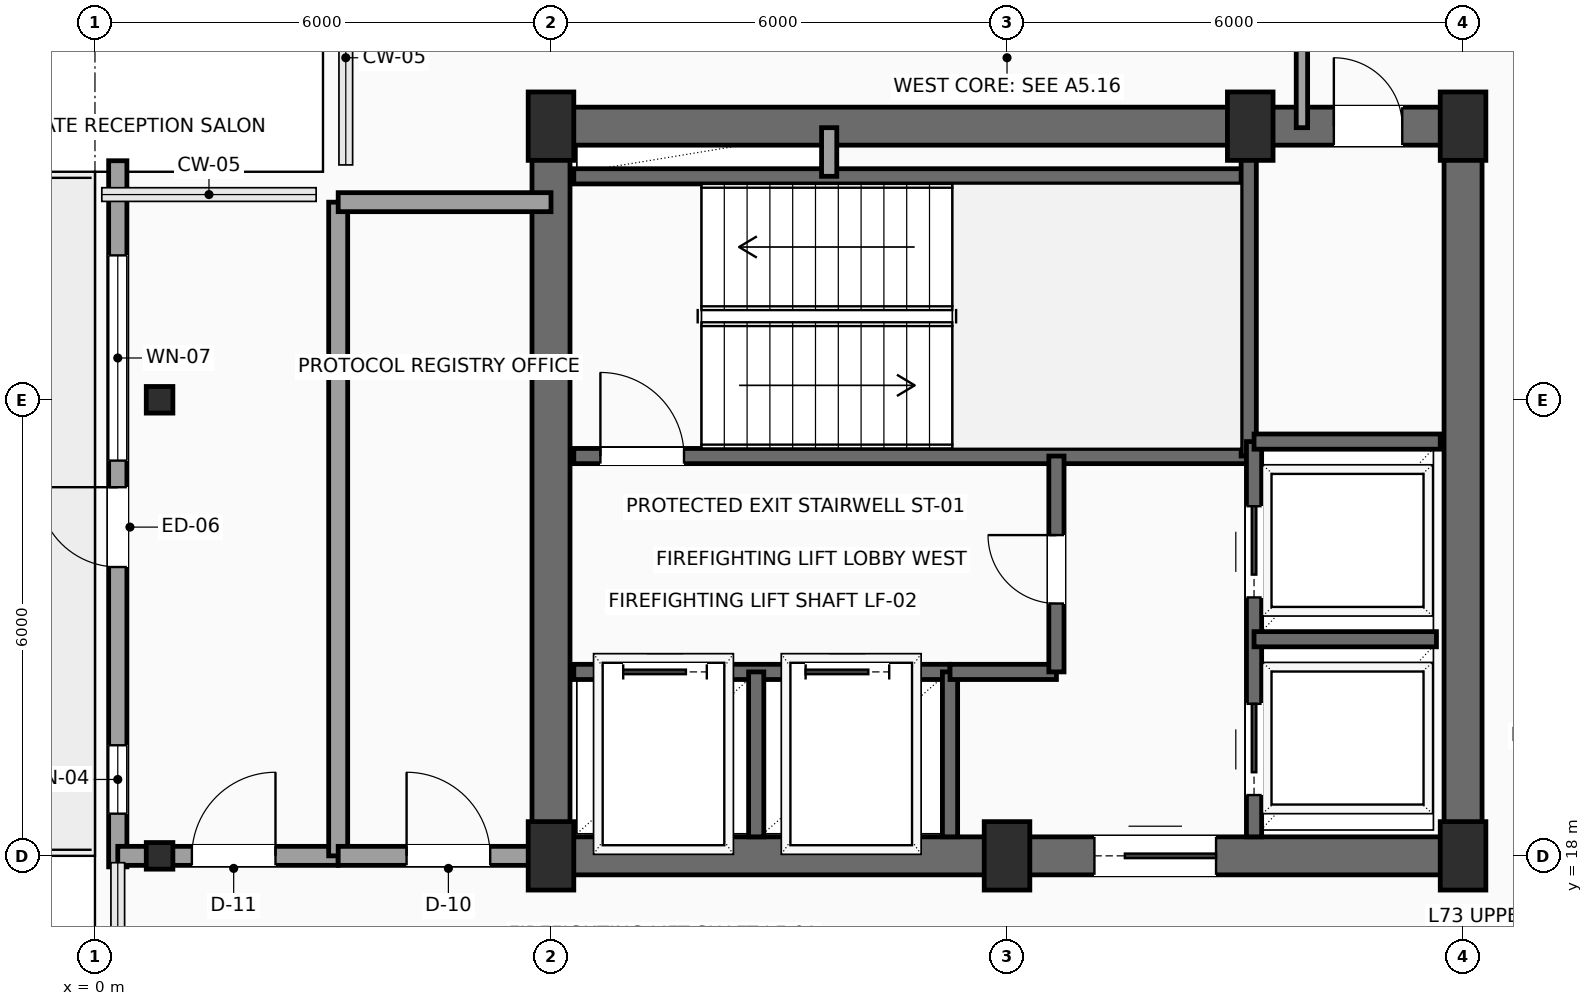
"""IFC4 building model, lengths in metres.
Left out: names, types, materials, properties, quantities, classifications, styles, units other than length and angle.
Written with IfcOpenShell. Run it as: python <this file> out.ifc"""

import sys

from ifc_helpers import new_model, si_unit, direction, frame, frame_2d, origin, origin_2d, place, context, subcontext, project, spatial, rectangle, hollow_rectangle, extrude, element, fill, save


model = new_model("IFC4")
c1 = context("Model", 3, precision=1e-05, world=origin(), true_north=direction((0.0, 1.0)))
c2 = subcontext(c1, "Body", "Model", "MODEL_VIEW")
j1 = project(units=[si_unit("LENGTHUNIT", "METRE"), si_unit("PLANEANGLEUNIT", "RADIAN")], contexts=[c1])
p1 = place(None, origin())
s1 = spatial("IfcSite", under=j1, at=p1, CompositionType="ELEMENT")
p2 = place(p1, origin())
s2 = spatial("IfcBuilding", under=s1, at=p2, CompositionType="ELEMENT")
p3 = place(p2, frame((0.0, 0.0, 288.7)))
s3 = spatial("IfcBuildingStorey", under=s2, at=p3, CompositionType="ELEMENT", Elevation=288.7)
for number, where, z_axis, x_axis in (
    (1, (6.0, 18.0, 0.0), (0.0, 0.0, 1.0), (1.0, 0.0, 0.0)),
    (2, (12.0, 18.0, 0.0), (0.0, 0.0, 1.0), (1.0, 0.0, 0.0)),
    (3, (18.0, 18.0, 0.0), (0.0, 0.0, 1.0), (1.0, 0.0, 0.0)),
    (4, (6.0, 27.6, 0.0), (0.0, 0.0, 1.0), (1.0, 0.0, 0.0)),
    (5, (15.2, 27.6, 0.0), (0.0, 0.0, 1.0), (1.0, 0.0, 0.0)),
    (6, (18.0, 27.6, 0.0), (0.0, 0.0, 1.0), (1.0, 0.0, 0.0)),
):
    element("IfcColumn", number, at=place(p3, frame(where, z_axis=z_axis, x_axis=x_axis)), inside=s3, PredefinedType="COLUMN", context=c2, shape_type="SweptSolid", body=[
        extrude(rectangle(XDim=0.6, YDim=0.9, at=origin_2d()), origin(), (0.0, 0.0, 1.0), 3.5),
    ])
for number, where, z_axis, x_axis in (
    (7, (0.85, 18.0, 0.0), (0.0, 0.0, 1.0), (1.0, 0.0, 0.0)),
    (8, (0.85, 24.0, 0.0), (0.0, 0.0, 1.0), (1.0, 0.0, 0.0)),
):
    element("IfcColumn", number, at=place(p3, frame(where, z_axis=z_axis, x_axis=x_axis)), inside=s3, PredefinedType="COLUMN", context=c2, shape_type="SweptSolid", body=[
        extrude(hollow_rectangle(XDim=0.35, YDim=0.35, WallThickness=0.016, InnerFilletRadius=0.016, OuterFilletRadius=0.032, at=origin_2d()), origin(), (0.0, 0.0, 1.0), 3.5),
    ])
p4 = place(p3, frame((0.3, 17.855, 0.0), z_axis=(0.0, 0.0, 1.0), x_axis=(0.0, 1.0, 0.0)))
e9 = element("IfcWall", 9, at=p4, inside=s3, PredefinedType="SOLIDWALL", context=c2, shape_type="SweptSolid", body=[
    extrude(rectangle(XDim=9.29, YDim=0.24, at=frame_2d((4.645, 0.0))), origin(), (0.0, 0.0, 1.0), 3.3),
])
p5 = place(p4, frame((3.945, 0.0, 0.0)))
e10 = element("IfcOpeningElement", 10, at=p5, cuts=e9, PredefinedType="OPENING", context=c2, shape_type="SweptSolid", body=[
    extrude(rectangle(XDim=1.05, YDim=2.2, at=frame_2d((0.525, 1.1))), frame((0.0, 0.13, 0.0), z_axis=(0.0, -1.0, 0.0), x_axis=(1.0, 0.0, 0.0)), (0.0, 0.0, 1.0), 0.26),
])
p6 = place(p4, frame((5.345, 0.0, 0.6)))
e11 = element("IfcOpeningElement", 11, at=p6, cuts=e9, PredefinedType="OPENING", context=c2, shape_type="SweptSolid", body=[
    extrude(rectangle(XDim=2.7, YDim=2.3, at=frame_2d((1.35, 1.15))), frame((0.0, 0.13, 0.0), z_axis=(0.0, -1.0, 0.0), x_axis=(1.0, 0.0, 0.0)), (0.0, 0.0, 1.0), 0.26),
])
p7 = place(p4, frame((0.7, 0.0, 0.6)))
e12 = element("IfcOpeningElement", 12, at=p7, cuts=e9, PredefinedType="OPENING", context=c2, shape_type="SweptSolid", body=[
    extrude(rectangle(XDim=0.9, YDim=2.2, at=frame_2d((0.45, 1.1))), frame((0.0, 0.13, 0.0), z_axis=(0.0, -1.0, 0.0), x_axis=(1.0, 0.0, 0.0)), (0.0, 0.0, 1.0), 0.26),
])
p8 = place(p3, frame((6.0, 18.0, 0.0), z_axis=(0.0, 0.0, 1.0), x_axis=(1.0, 0.0, 0.0)))
e13 = element("IfcWall", 13, at=p8, inside=s3, PredefinedType="SHEAR", context=c2, shape_type="SweptSolid", body=[
    extrude(rectangle(XDim=12.0, YDim=0.5, at=frame_2d((6.0, 0.0))), origin(), (0.0, 0.0, 1.0), 3.3),
])
p9 = place(p8, frame((7.15, 0.0, 0.0)))
e14 = element("IfcOpeningElement", 14, at=p9, cuts=e13, PredefinedType="OPENING", context=c2, shape_type="SweptSolid", body=[
    extrude(rectangle(XDim=1.6, YDim=2.3, at=frame_2d((0.8, 1.15))), frame((0.0, 0.26, 0.0), z_axis=(0.0, -1.0, 0.0), x_axis=(1.0, 0.0, 0.0)), (0.0, 0.0, 1.0), 0.52),
])
p10 = place(p3, frame((6.0, 27.6, 0.0), z_axis=(0.0, 0.0, 1.0), x_axis=(1.0, 0.0, 0.0)))
e15 = element("IfcWall", 15, at=p10, inside=s3, PredefinedType="SHEAR", context=c2, shape_type="SweptSolid", body=[
    extrude(rectangle(XDim=12.0, YDim=0.5, at=frame_2d((6.0, 0.0))), origin(), (0.0, 0.0, 1.0), 3.3),
])
p11 = place(p10, frame((10.3, 0.0, 0.0)))
e16 = element("IfcOpeningElement", 16, at=p11, cuts=e15, PredefinedType="OPENING", context=c2, shape_type="SweptSolid", body=[
    extrude(rectangle(XDim=0.9, YDim=2.15, at=frame_2d((0.45, 1.075))), frame((0.0, 0.26, 0.0), z_axis=(0.0, -1.0, 0.0), x_axis=(1.0, 0.0, 0.0)), (0.0, 0.0, 1.0), 0.52),
])
for number, where, z_axis, x_axis in (
    (17, (6.0, 18.0, 0.0), (0.0, 0.0, 1.0), (0.0, 1.0, 0.0)),
    (18, (18.0, 18.0, 0.0), (0.0, 0.0, 1.0), (0.0, 1.0, 0.0)),
):
    element("IfcWall", number, at=place(p3, frame(where, z_axis=z_axis, x_axis=x_axis)), inside=s3, PredefinedType="SHEAR", context=c2, shape_type="SweptSolid", body=[
        extrude(rectangle(XDim=9.6, YDim=0.5, at=frame_2d((4.8, 0.0))), origin(), (0.0, 0.0, 1.0), 3.3),
    ])
p12 = place(p3, frame((6.3, 23.26, 0.0), z_axis=(0.0, 0.0, 1.0), x_axis=(1.0, 0.0, 0.0)))
e19 = element("IfcWall", 19, at=p12, inside=s3, PredefinedType="SHEAR", context=c2, shape_type="SweptSolid", body=[
    extrude(rectangle(XDim=8.88, YDim=0.2, at=frame_2d((4.44, 0.0))), origin(), (0.0, 0.0, 1.0), 3.3),
])
p13 = place(p12, frame((0.35, 0.0, 0.0)))
e20 = element("IfcOpeningElement", 20, at=p13, cuts=e19, PredefinedType="OPENING", context=c2, shape_type="SweptSolid", body=[
    extrude(rectangle(XDim=1.1, YDim=2.2, at=frame_2d((0.55, 1.1))), frame((0.0, 0.11, 0.0), z_axis=(0.0, -1.0, 0.0), x_axis=(1.0, 0.0, 0.0)), (0.0, 0.0, 1.0), 0.22),
])
p14 = place(p3, frame((6.3, 26.94, 0.0), z_axis=(0.0, 0.0, 1.0), x_axis=(1.0, 0.0, 0.0)))
e21 = element("IfcWall", 21, at=p14, inside=s3, PredefinedType="SHEAR", context=c2, shape_type="SweptSolid", body=[
    extrude(rectangle(XDim=8.88, YDim=0.2, at=frame_2d((4.44, 0.0))), origin(), (0.0, 0.0, 1.0), 3.3),
])
p15 = place(p3, frame((15.18, 23.26, 0.0), z_axis=(0.0, 0.0, 1.0), x_axis=(0.0, 1.0, 0.0)))
e22 = element("IfcWall", 22, at=p15, inside=s3, PredefinedType="SHEAR", context=c2, shape_type="SweptSolid", body=[
    extrude(rectangle(XDim=4.04, YDim=0.2, at=frame_2d((2.02, 0.0))), origin(), (0.0, 0.0, 1.0), 3.3),
])
p16 = place(p3, frame((6.3, 20.42, 0.0), z_axis=(0.0, 0.0, 1.0), x_axis=(1.0, 0.0, 0.0)))
e23 = element("IfcWall", 23, at=p16, inside=s3, PredefinedType="SHEAR", context=c2, shape_type="SweptSolid", body=[
    extrude(rectangle(XDim=4.95, YDim=0.2, at=frame_2d((2.475, 0.0))), origin(), (0.0, 0.0, 1.0), 3.3),
])
p17 = place(p16, frame((0.65, 0.0, 0.0)))
e24 = element("IfcOpeningElement", 24, at=p17, cuts=e23, PredefinedType="OPENING", context=c2, shape_type="SweptSolid", body=[
    extrude(rectangle(XDim=1.1, YDim=2.2, at=frame_2d((0.55, 1.1))), frame((0.0, 0.11, 0.0), z_axis=(0.0, -1.0, 0.0), x_axis=(1.0, 0.0, 0.0)), (0.0, 0.0, 1.0), 0.22),
])
p18 = place(p16, frame((3.05, 0.0, 0.0)))
e25 = element("IfcOpeningElement", 25, at=p18, cuts=e23, PredefinedType="OPENING", context=c2, shape_type="SweptSolid", body=[
    extrude(rectangle(XDim=1.1, YDim=2.2, at=frame_2d((0.55, 1.1))), frame((0.0, 0.11, 0.0), z_axis=(0.0, -1.0, 0.0), x_axis=(1.0, 0.0, 0.0)), (0.0, 0.0, 1.0), 0.22),
])
for number, where, z_axis, x_axis in (
    (26, (8.7, 18.25, 0.0), (0.0, 0.0, 1.0), (0.0, 1.0, 0.0)),
    (27, (11.25, 18.25, 0.0), (0.0, 0.0, 1.0), (0.0, 1.0, 0.0)),
):
    element("IfcWall", number, at=place(p3, frame(where, z_axis=z_axis, x_axis=x_axis)), inside=s3, PredefinedType="SHEAR", context=c2, shape_type="SweptSolid", body=[
        extrude(rectangle(XDim=2.17, YDim=0.2, at=frame_2d((1.085, 0.0))), origin(), (0.0, 0.0, 1.0), 3.3),
    ])
p19 = place(p3, frame((11.25, 20.42, 0.0), z_axis=(0.0, 0.0, 1.0), x_axis=(1.0, 0.0, 0.0)))
e28 = element("IfcWall", 28, at=p19, inside=s3, PredefinedType="SHEAR", context=c2, shape_type="SweptSolid", body=[
    extrude(rectangle(XDim=1.4, YDim=0.2, at=frame_2d((0.7, 0.0))), origin(), (0.0, 0.0, 1.0), 3.3),
])
p20 = place(p3, frame((12.65, 20.42, 0.0), z_axis=(0.0, 0.0, 1.0), x_axis=(0.0, 1.0, 0.0)))
e29 = element("IfcWall", 29, at=p20, inside=s3, PredefinedType="SHEAR", context=c2, shape_type="SweptSolid", body=[
    extrude(rectangle(XDim=2.84, YDim=0.2, at=frame_2d((1.42, 0.0))), origin(), (0.0, 0.0, 1.0), 3.3),
])
p21 = place(p20, frame((0.9, 0.0, 0.0)))
e30 = element("IfcOpeningElement", 30, at=p21, cuts=e29, PredefinedType="OPENING", context=c2, shape_type="SweptSolid", body=[
    extrude(rectangle(XDim=0.9, YDim=2.15, at=frame_2d((0.45, 1.075))), frame((0.0, 0.11, 0.0), z_axis=(0.0, -1.0, 0.0), x_axis=(1.0, 0.0, 0.0)), (0.0, 0.0, 1.0), 0.22),
])
p22 = place(p3, frame((9.66, 26.94, 0.0), z_axis=(0.0, 0.0, 1.0), x_axis=(0.0, 1.0, 0.0)))
e31 = element("IfcWall", 31, at=p22, inside=s3, PredefinedType="SOLIDWALL", context=c2, shape_type="SweptSolid", body=[
    extrude(rectangle(XDim=0.64, YDim=0.2, at=frame_2d((0.32, 0.0))), origin(), (0.0, 0.0, 1.0), 3.3),
])
p23 = place(p3, frame((15.25, 18.25, 0.0), z_axis=(0.0, 0.0, 1.0), x_axis=(0.0, 1.0, 0.0)))
e32 = element("IfcWall", 32, at=p23, inside=s3, PredefinedType="SHEAR", context=c2, shape_type="SweptSolid", body=[
    extrude(rectangle(XDim=5.2, YDim=0.2, at=frame_2d((2.6, 0.0))), origin(), (0.0, 0.0, 1.0), 3.3),
])
p24 = place(p23, frame((0.55, 0.0, 0.0)))
e33 = element("IfcOpeningElement", 33, at=p24, cuts=e32, PredefinedType="OPENING", context=c2, shape_type="SweptSolid", body=[
    extrude(rectangle(XDim=1.2, YDim=2.2, at=frame_2d((0.6, 1.1))), frame((0.0, 0.11, 0.0), z_axis=(0.0, -1.0, 0.0), x_axis=(1.0, 0.0, 0.0)), (0.0, 0.0, 1.0), 0.22),
])
p25 = place(p23, frame((3.15, 0.0, 0.0)))
e34 = element("IfcOpeningElement", 34, at=p25, cuts=e32, PredefinedType="OPENING", context=c2, shape_type="SweptSolid", body=[
    extrude(rectangle(XDim=1.2, YDim=2.2, at=frame_2d((0.6, 1.1))), frame((0.0, 0.11, 0.0), z_axis=(0.0, -1.0, 0.0), x_axis=(1.0, 0.0, 0.0)), (0.0, 0.0, 1.0), 0.22),
])
p26 = place(p3, frame((15.25, 20.85, 0.0), z_axis=(0.0, 0.0, 1.0), x_axis=(1.0, 0.0, 0.0)))
e35 = element("IfcWall", 35, at=p26, inside=s3, PredefinedType="SHEAR", context=c2, shape_type="SweptSolid", body=[
    extrude(rectangle(XDim=2.4, YDim=0.2, at=frame_2d((1.2, 0.0))), origin(), (0.0, 0.0, 1.0), 3.3),
])
p27 = place(p3, frame((15.25, 23.45, 0.0), z_axis=(0.0, 0.0, 1.0), x_axis=(1.0, 0.0, 0.0)))
e36 = element("IfcWall", 36, at=p27, inside=s3, PredefinedType="SHEAR", context=c2, shape_type="SweptSolid", body=[
    extrude(rectangle(XDim=2.45, YDim=0.2, at=frame_2d((1.225, 0.0))), origin(), (0.0, 0.0, 1.0), 3.3),
])
p28 = place(p3, frame((15.88, 27.58, 0.0), z_axis=(0.0, 0.0, 1.0), x_axis=(0.0, 1.0, 0.0)))
e37 = element("IfcWall", 37, at=p28, inside=s3, PredefinedType="PARTITIONING", context=c2, shape_type="SweptSolid", body=[
    extrude(rectangle(XDim=2.12, YDim=0.15, at=frame_2d((1.06, 0.0))), origin(), (0.0, 0.0, 1.0), 3.3),
])
p29 = place(p3, frame((0.3, 18.0, 0.0), z_axis=(0.0, 0.0, 1.0), x_axis=(1.0, 0.0, 0.0)))
e38 = element("IfcWall", 38, at=p29, inside=s3, PredefinedType="PARTITIONING", context=c2, shape_type="SweptSolid", body=[
    extrude(rectangle(XDim=2.9, YDim=0.25, at=frame_2d((1.45, 0.0))), origin(), (0.0, 0.0, 1.0), 2.967),
])
p30 = place(p29, frame((0.975, 0.0, 0.0)))
e39 = element("IfcOpeningElement", 39, at=p30, cuts=e38, PredefinedType="OPENING", context=c2, shape_type="SweptSolid", body=[
    extrude(rectangle(XDim=1.1, YDim=2.25, at=frame_2d((0.55, 1.125))), frame((0.0, 0.135, 0.0), z_axis=(0.0, -1.0, 0.0), x_axis=(1.0, 0.0, 0.0)), (0.0, 0.0, 1.0), 0.27),
])
p31 = place(p3, frame((3.2, 18.0, 0.0), z_axis=(0.0, 0.0, 1.0), x_axis=(0.0, 1.0, 0.0)))
e40 = element("IfcWall", 40, at=p31, inside=s3, PredefinedType="PARTITIONING", context=c2, shape_type="SweptSolid", body=[
    extrude(rectangle(XDim=8.6, YDim=0.25, at=frame_2d((4.3, 0.0))), origin(), (0.0, 0.0, 1.0), 3.3),
])
p32 = place(p3, frame((3.2, 18.0, 0.0), z_axis=(0.0, 0.0, 1.0), x_axis=(1.0, 0.0, 0.0)))
e41 = element("IfcWall", 41, at=p32, inside=s3, PredefinedType="PARTITIONING", context=c2, shape_type="SweptSolid", body=[
    extrude(rectangle(XDim=2.8, YDim=0.25, at=frame_2d((1.4, 0.0))), origin(), (0.0, 0.0, 1.0), 2.992),
])
p33 = place(p32, frame((0.9, 0.0, 0.0)))
e42 = element("IfcOpeningElement", 42, at=p33, cuts=e41, PredefinedType="OPENING", context=c2, shape_type="SweptSolid", body=[
    extrude(rectangle(XDim=1.1, YDim=2.25, at=frame_2d((0.55, 1.125))), frame((0.0, 0.135, 0.0), z_axis=(0.0, -1.0, 0.0), x_axis=(1.0, 0.0, 0.0)), (0.0, 0.0, 1.0), 0.27),
])
p34 = place(p3, frame((3.2, 26.6, 0.0), z_axis=(0.0, 0.0, 1.0), x_axis=(1.0, 0.0, 0.0)))
e43 = element("IfcWall", 43, at=p34, inside=s3, PredefinedType="PARTITIONING", context=c2, shape_type="SweptSolid", body=[
    extrude(rectangle(XDim=2.8, YDim=0.25, at=frame_2d((1.4, 0.0))), origin(), (0.0, 0.0, 1.0), 3.3),
])
p35 = place(p5, origin())
e44 = element("IfcDoor", 44, at=p35, inside=s3, OperationType="SINGLE_SWING_RIGHT", PredefinedType="DOOR", context=c2, shape_type="SweptSolid", body=[
    extrude(rectangle(XDim=1.05, YDim=2.2, at=frame_2d((0.525, 1.1))), frame((0.0, 0.025, 0.0), z_axis=(0.0, -1.0, 0.0), x_axis=(1.0, 0.0, 0.0)), (0.0, 0.0, 1.0), 0.05),
])
fill(e10, e44)
p36 = place(p6, origin())
e45 = element("IfcWindow", 45, at=p36, inside=s3, PartitioningType="SINGLE_PANEL", PredefinedType="WINDOW", context=c2, shape_type="SweptSolid", body=[
    extrude(rectangle(XDim=2.7, YDim=2.3, at=frame_2d((1.35, 1.15))), frame((0.0, 0.03, 0.0), z_axis=(0.0, -1.0, 0.0), x_axis=(1.0, 0.0, 0.0)), (0.0, 0.0, 1.0), 0.06),
])
fill(e11, e45)
p37 = place(p7, origin())
e46 = element("IfcWindow", 46, at=p37, inside=s3, PartitioningType="SINGLE_PANEL", PredefinedType="WINDOW", context=c2, shape_type="SweptSolid", body=[
    extrude(rectangle(XDim=0.9, YDim=2.2, at=frame_2d((0.45, 1.1))), frame((0.0, 0.03, 0.0), z_axis=(0.0, -1.0, 0.0), x_axis=(1.0, 0.0, 0.0)), (0.0, 0.0, 1.0), 0.06),
])
fill(e12, e46)
p38 = place(p9, origin())
e47 = element("IfcDoor", 47, at=p38, inside=s3, OperationType="DOUBLE_DOOR_SLIDING", PredefinedType="DOOR", context=c2, shape_type="SweptSolid", body=[
    extrude(rectangle(XDim=1.6, YDim=2.3, at=frame_2d((0.8, 1.15))), frame((0.0, 0.025, 0.0), z_axis=(0.0, -1.0, 0.0), x_axis=(1.0, 0.0, 0.0)), (0.0, 0.0, 1.0), 0.05),
])
fill(e14, e47)
p39 = place(p11, origin())
e48 = element("IfcDoor", 48, at=p39, inside=s3, OperationType="SINGLE_SWING_LEFT", PredefinedType="DOOR", context=c2, shape_type="SweptSolid", body=[
    extrude(rectangle(XDim=0.9, YDim=2.15, at=frame_2d((0.45, 1.075))), frame((0.0, 0.025, 0.0), z_axis=(0.0, -1.0, 0.0), x_axis=(1.0, 0.0, 0.0)), (0.0, 0.0, 1.0), 0.05),
])
fill(e16, e48)
p40 = place(p13, origin())
e49 = element("IfcDoor", 49, at=p40, inside=s3, OperationType="SINGLE_SWING_LEFT", PredefinedType="DOOR", context=c2, shape_type="SweptSolid", body=[
    extrude(rectangle(XDim=1.1, YDim=2.2, at=frame_2d((0.55, 1.1))), frame((0.0, 0.025, 0.0), z_axis=(0.0, -1.0, 0.0), x_axis=(1.0, 0.0, 0.0)), (0.0, 0.0, 1.0), 0.05),
])
fill(e20, e49)
p41 = place(p17, origin())
e50 = element("IfcDoor", 50, at=p41, inside=s3, OperationType="SLIDING_TO_LEFT", PredefinedType="DOOR", context=c2, shape_type="SweptSolid", body=[
    extrude(rectangle(XDim=1.1, YDim=2.2, at=frame_2d((0.55, 1.1))), frame((0.0, 0.025, 0.0), z_axis=(0.0, -1.0, 0.0), x_axis=(1.0, 0.0, 0.0)), (0.0, 0.0, 1.0), 0.05),
])
fill(e24, e50)
p42 = place(p18, origin())
e51 = element("IfcDoor", 51, at=p42, inside=s3, OperationType="SLIDING_TO_LEFT", PredefinedType="DOOR", context=c2, shape_type="SweptSolid", body=[
    extrude(rectangle(XDim=1.1, YDim=2.2, at=frame_2d((0.55, 1.1))), frame((0.0, 0.025, 0.0), z_axis=(0.0, -1.0, 0.0), x_axis=(1.0, 0.0, 0.0)), (0.0, 0.0, 1.0), 0.05),
])
fill(e25, e51)
p43 = place(p21, origin())
e52 = element("IfcDoor", 52, at=p43, inside=s3, OperationType="SINGLE_SWING_RIGHT", PredefinedType="DOOR", context=c2, shape_type="SweptSolid", body=[
    extrude(rectangle(XDim=0.9, YDim=2.15, at=frame_2d((0.45, 1.075))), frame((0.0, 0.025, 0.0), z_axis=(0.0, -1.0, 0.0), x_axis=(1.0, 0.0, 0.0)), (0.0, 0.0, 1.0), 0.05),
])
fill(e30, e52)
p44 = place(p24, origin())
e53 = element("IfcDoor", 53, at=p44, inside=s3, OperationType="SLIDING_TO_RIGHT", PredefinedType="DOOR", context=c2, shape_type="SweptSolid", body=[
    extrude(rectangle(XDim=1.2, YDim=2.2, at=frame_2d((0.6, 1.1))), frame((0.0, 0.025, 0.0), z_axis=(0.0, -1.0, 0.0), x_axis=(1.0, 0.0, 0.0)), (0.0, 0.0, 1.0), 0.05),
])
fill(e33, e53)
p45 = place(p25, origin())
e54 = element("IfcDoor", 54, at=p45, inside=s3, OperationType="SLIDING_TO_RIGHT", PredefinedType="DOOR", context=c2, shape_type="SweptSolid", body=[
    extrude(rectangle(XDim=1.2, YDim=2.2, at=frame_2d((0.6, 1.1))), frame((0.0, 0.025, 0.0), z_axis=(0.0, -1.0, 0.0), x_axis=(1.0, 0.0, 0.0)), (0.0, 0.0, 1.0), 0.05),
])
fill(e34, e54)
p46 = place(p30, origin())
e55 = element("IfcDoor", 55, at=p46, inside=s3, OperationType="SINGLE_SWING_RIGHT", PredefinedType="DOOR", context=c2, shape_type="SweptSolid", body=[
    extrude(rectangle(XDim=1.1, YDim=2.25, at=frame_2d((0.55, 1.125))), frame((0.0, 0.025, 0.0), z_axis=(0.0, -1.0, 0.0), x_axis=(1.0, 0.0, 0.0)), (0.0, 0.0, 1.0), 0.05),
])
fill(e39, e55)
p47 = place(p33, origin())
e56 = element("IfcDoor", 56, at=p47, inside=s3, OperationType="SINGLE_SWING_LEFT", PredefinedType="DOOR", context=c2, shape_type="SweptSolid", body=[
    extrude(rectangle(XDim=1.1, YDim=2.25, at=frame_2d((0.55, 1.125))), frame((0.0, 0.025, 0.0), z_axis=(0.0, -1.0, 0.0), x_axis=(1.0, 0.0, 0.0)), (0.0, 0.0, 1.0), 0.05),
])
fill(e42, e56)
save(model, sys.argv[1])
